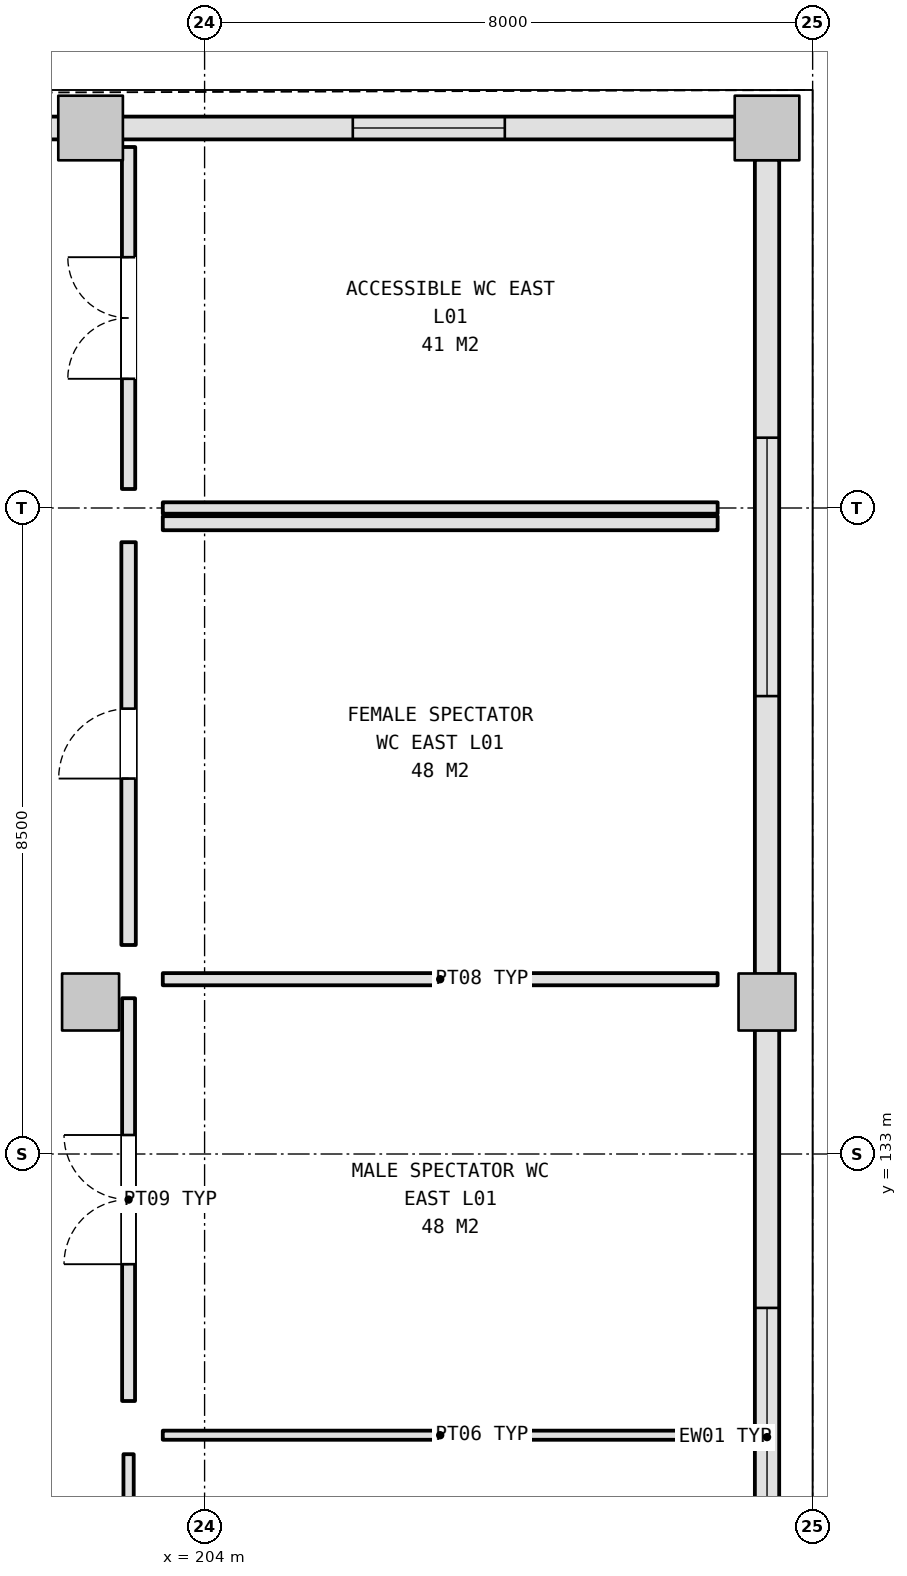
"""IFC4 building model, lengths in metres.
Left out: names, types, materials, properties, quantities, classifications, styles, units other than length and angle.
Written with IfcOpenShell. Run it as: python <this file> out.ifc"""

import sys

from ifc_helpers import new_model, si_unit, direction, frame, frame_2d, origin, origin_2d, place, context, subcontext, project, spatial, rectangle, extrude, element, fill, save


model = new_model("IFC4")
c1 = context("Model", 3, precision=1e-05, world=origin(), true_north=direction((0.0, 1.0)))
c2 = subcontext(c1, "Body", "Model", "MODEL_VIEW")
j1 = project(units=[si_unit("LENGTHUNIT", "METRE"), si_unit("PLANEANGLEUNIT", "RADIAN")], contexts=[c1])
p1 = place(None, origin())
s1 = spatial("IfcSite", under=j1, at=p1, CompositionType="ELEMENT")
p2 = place(p1, origin())
s2 = spatial("IfcBuilding", under=s1, at=p2, CompositionType="ELEMENT")
p3 = place(p2, frame((0.0, 0.0, 5.4)))
s3 = spatial("IfcBuildingStorey", under=s2, at=p3, CompositionType="ELEMENT", Elevation=5.4)
p4 = place(p3, frame((202.5, 135.0, 0.0), z_axis=(0.0, 0.0, 1.0), x_axis=(1.0, 0.0, 0.0)))
e1 = element("IfcColumn", 1, at=p4, inside=s3, PredefinedType="COLUMN", context=c2, shape_type="SweptSolid", body=[
    extrude(rectangle(XDim=0.75, YDim=0.75, at=origin_2d()), origin(), (0.0, 0.0, 1.0), 5.4),
])
p5 = place(p3, frame((202.5, 146.5, 0.0), z_axis=(0.0, 0.0, 1.0), x_axis=(1.0, 0.0, 0.0)))
e2 = element("IfcColumn", 2, at=p5, inside=s3, PredefinedType="COLUMN", context=c2, shape_type="SweptSolid", body=[
    extrude(rectangle(XDim=0.85, YDim=0.85, at=origin_2d()), origin(), (0.0, 0.0, 1.0), 5.4),
])
p6 = place(p3, frame((211.4, 135.0, 0.0), z_axis=(0.0, 0.0, 1.0), x_axis=(1.0, 0.0, 0.0)))
e3 = element("IfcColumn", 3, at=p6, inside=s3, PredefinedType="COLUMN", context=c2, shape_type="SweptSolid", body=[
    extrude(rectangle(XDim=0.75, YDim=0.75, at=origin_2d()), origin(), (0.0, 0.0, 1.0), 5.4),
])
p7 = place(p3, frame((211.4, 146.5, 0.0), z_axis=(0.0, 0.0, 1.0), x_axis=(1.0, 0.0, 0.0)))
e4 = element("IfcColumn", 4, at=p7, inside=s3, PredefinedType="COLUMN", context=c2, shape_type="SweptSolid", body=[
    extrude(rectangle(XDim=0.85, YDim=0.85, at=origin_2d()), origin(), (0.0, 0.0, 1.0), 5.4),
])
p8 = place(p3, frame((211.4, 123.913, 0.0), z_axis=(0.0, 0.0, 1.0), x_axis=(0.0, 1.0, 0.0)))
e5 = element("IfcWall", 5, at=p8, inside=s3, PredefinedType="SOLIDWALL", context=c2, shape_type="SweptSolid", body=[
    extrude(rectangle(XDim=10.724, YDim=0.32, at=frame_2d((5.362, 0.0))), origin(), (0.0, 0.0, 1.0), 4.475),
])
p9 = place(p8, frame((3.662, 0.0, 1.2)))
e6 = element("IfcOpeningElement", 6, at=p9, cuts=e5, PredefinedType="OPENING", context=c2, shape_type="SweptSolid", body=[
    extrude(rectangle(XDim=3.4, YDim=1.5, at=frame_2d((1.7, 0.75))), frame((0.0, 0.17, 0.0), z_axis=(0.0, -1.0, 0.0), x_axis=(1.0, 0.0, 0.0)), (0.0, 0.0, 1.0), 0.34),
])
p10 = place(p3, frame((211.4, 135.363, 0.0), z_axis=(0.0, 0.0, 1.0), x_axis=(0.0, 1.0, 0.0)))
e7 = element("IfcWall", 7, at=p10, inside=s3, PredefinedType="SOLIDWALL", context=c2, shape_type="SweptSolid", body=[
    extrude(rectangle(XDim=10.724, YDim=0.32, at=frame_2d((5.362, 0.0))), origin(), (0.0, 0.0, 1.0), 4.475),
])
p11 = place(p10, frame((3.662, 0.0, 1.2)))
e8 = element("IfcOpeningElement", 8, at=p11, cuts=e7, PredefinedType="OPENING", context=c2, shape_type="SweptSolid", body=[
    extrude(rectangle(XDim=3.4, YDim=1.5, at=frame_2d((1.7, 0.75))), frame((0.0, 0.17, 0.0), z_axis=(0.0, -1.0, 0.0), x_axis=(1.0, 0.0, 0.0)), (0.0, 0.0, 1.0), 0.34),
])
p12 = place(p3, frame((194.013, 146.5, 0.0), z_axis=(0.0, 0.0, 1.0), x_axis=(1.0, 0.0, 0.0)))
e9 = element("IfcWall", 9, at=p12, inside=s3, PredefinedType="SOLIDWALL", context=c2, shape_type="SweptSolid", body=[
    extrude(rectangle(XDim=8.074, YDim=0.3, at=frame_2d((4.037, 0.0))), origin(), (0.0, 0.0, 1.0), 4.525),
])
p13 = place(p12, frame((3.037, 0.0, 1.05)))
e10 = element("IfcOpeningElement", 10, at=p13, cuts=e9, PredefinedType="OPENING", context=c2, shape_type="SweptSolid", body=[
    extrude(rectangle(XDim=2.0, YDim=1.7, at=frame_2d((1.0, 0.85))), frame((0.0, 0.16, 0.0), z_axis=(0.0, -1.0, 0.0), x_axis=(1.0, 0.0, 0.0)), (0.0, 0.0, 1.0), 0.32),
])
p14 = place(p3, frame((202.913, 146.5, 0.0), z_axis=(0.0, 0.0, 1.0), x_axis=(1.0, 0.0, 0.0)))
e11 = element("IfcWall", 11, at=p14, inside=s3, PredefinedType="SOLIDWALL", context=c2, shape_type="SweptSolid", body=[
    extrude(rectangle(XDim=8.074, YDim=0.3, at=frame_2d((4.037, 0.0))), origin(), (0.0, 0.0, 1.0), 4.525),
])
p15 = place(p14, frame((3.037, 0.0, 1.05)))
e12 = element("IfcOpeningElement", 12, at=p15, cuts=e11, PredefinedType="OPENING", context=c2, shape_type="SweptSolid", body=[
    extrude(rectangle(XDim=2.0, YDim=1.7, at=frame_2d((1.0, 0.85))), frame((0.0, 0.16, 0.0), z_axis=(0.0, -1.0, 0.0), x_axis=(1.0, 0.0, 0.0)), (0.0, 0.0, 1.0), 0.32),
])
p16 = place(p3, frame((203.0, 119.75, 0.0), z_axis=(0.0, 0.0, 1.0), x_axis=(0.0, 1.0, 0.0)))
e13 = element("IfcWall", 13, at=p16, inside=s3, PredefinedType="PARTITIONING", context=c2, shape_type="SweptSolid", body=[
    extrude(rectangle(XDim=9.3, YDim=0.135, at=frame_2d((4.65, 0.0))), origin(), (0.0, 0.0, 1.0), 4.625),
])
p17 = place(p16, frame((4.575, 0.0, 0.0)))
e14 = element("IfcOpeningElement", 14, at=p17, cuts=e13, PredefinedType="OPENING", context=c2, shape_type="SweptSolid", body=[
    extrude(rectangle(XDim=0.95, YDim=2.15, at=frame_2d((0.475, 1.075))), frame((0.0, 0.077, 0.0), z_axis=(0.0, -1.0, 0.0), x_axis=(1.0, 0.0, 0.0)), (0.0, 0.0, 1.0), 0.155),
])
p18 = place(p3, frame((203.45, 129.3, 0.0), z_axis=(0.0, 0.0, 1.0), x_axis=(1.0, 0.0, 0.0)))
e15 = element("IfcWall", 15, at=p18, inside=s3, PredefinedType="PARTITIONING", context=c2, shape_type="SweptSolid", body=[
    extrude(rectangle(XDim=7.3, YDim=0.12, at=frame_2d((3.65, 0.0))), origin(), (0.0, 0.0, 1.0), 4.625),
])
p19 = place(p3, frame((203.0, 129.75, 0.0), z_axis=(0.0, 0.0, 1.0), x_axis=(0.0, 1.0, 0.0)))
e16 = element("IfcWall", 16, at=p19, inside=s3, PredefinedType="PARTITIONING", context=c2, shape_type="SweptSolid", body=[
    extrude(rectangle(XDim=5.3, YDim=0.17, at=frame_2d((2.65, 0.0))), origin(), (0.0, 0.0, 1.0), 4.715),
])
p20 = place(p19, frame((1.8, 0.0, 0.0)))
e17 = element("IfcOpeningElement", 17, at=p20, cuts=e16, PredefinedType="OPENING", context=c2, shape_type="SweptSolid", body=[
    extrude(rectangle(XDim=1.7, YDim=2.25, at=frame_2d((0.85, 1.125))), frame((0.0, 0.095, 0.0), z_axis=(0.0, -1.0, 0.0), x_axis=(1.0, 0.0, 0.0)), (0.0, 0.0, 1.0), 0.19),
])
p21 = place(p3, frame((203.45, 135.3, 0.0), z_axis=(0.0, 0.0, 1.0), x_axis=(1.0, 0.0, 0.0)))
e18 = element("IfcWall", 18, at=p21, inside=s3, PredefinedType="PARTITIONING", context=c2, shape_type="SweptSolid", body=[
    extrude(rectangle(XDim=7.3, YDim=0.16, at=frame_2d((3.65, 0.0))), origin(), (0.0, 0.0, 1.0), 5.12),
])
p22 = place(p3, frame((203.0, 135.75, 0.0), z_axis=(0.0, 0.0, 1.0), x_axis=(0.0, 1.0, 0.0)))
e19 = element("IfcWall", 19, at=p22, inside=s3, PredefinedType="PARTITIONING", context=c2, shape_type="SweptSolid", body=[
    extrude(rectangle(XDim=5.3, YDim=0.19, at=frame_2d((2.65, 0.0))), origin(), (0.0, 0.0, 1.0), 4.625),
])
p23 = place(p22, frame((2.19, 0.0, 0.0)))
e20 = element("IfcOpeningElement", 20, at=p23, cuts=e19, PredefinedType="OPENING", context=c2, shape_type="SweptSolid", body=[
    extrude(rectangle(XDim=0.92, YDim=2.1, at=frame_2d((0.46, 1.05))), frame((0.0, 0.105, 0.0), z_axis=(0.0, -1.0, 0.0), x_axis=(1.0, 0.0, 0.0)), (0.0, 0.0, 1.0), 0.21),
])
p24 = place(p3, frame((203.45, 141.3, 0.0), z_axis=(0.0, 0.0, 1.0), x_axis=(1.0, 0.0, 0.0)))
e21 = element("IfcWall", 21, at=p24, inside=s3, PredefinedType="PARTITIONING", context=c2, shape_type="SweptSolid", body=[
    extrude(rectangle(XDim=7.3, YDim=0.185, at=frame_2d((3.65, 0.0))), origin(), (0.0, 0.0, 1.0), 5.12),
])
p25 = place(p3, frame((203.0, 141.75, 0.0), z_axis=(0.0, 0.0, 1.0), x_axis=(0.0, 1.0, 0.0)))
e22 = element("IfcWall", 22, at=p25, inside=s3, PredefinedType="PARTITIONING", context=c2, shape_type="SweptSolid", body=[
    extrude(rectangle(XDim=4.5, YDim=0.175, at=frame_2d((2.25, 0.0))), origin(), (0.0, 0.0, 1.0), 5.12),
])
p26 = place(p25, frame((1.45, 0.0, 0.0)))
e23 = element("IfcOpeningElement", 23, at=p26, cuts=e22, PredefinedType="OPENING", context=c2, shape_type="SweptSolid", body=[
    extrude(rectangle(XDim=1.6, YDim=2.2, at=frame_2d((0.8, 1.1))), frame((0.0, 0.097, 0.0), z_axis=(0.0, -1.0, 0.0), x_axis=(1.0, 0.0, 0.0)), (0.0, 0.0, 1.0), 0.195),
])
p27 = place(p3, frame((210.75, 141.5, 0.0), z_axis=(0.0, 0.0, 1.0), x_axis=(-1.0, 0.0, 0.0)))
e24 = element("IfcWall", 24, at=p27, inside=s3, PredefinedType="PARTITIONING", context=c2, shape_type="SweptSolid", body=[
    extrude(rectangle(XDim=7.3, YDim=0.15, at=frame_2d((3.65, 0.0))), origin(), (0.0, 0.0, 1.0), 5.12),
])
p28 = place(p9, origin())
e25 = element("IfcWindow", 25, at=p28, inside=s3, PartitioningType="SINGLE_PANEL", PredefinedType="WINDOW", context=c2, shape_type="SweptSolid", body=[
    extrude(rectangle(XDim=3.4, YDim=1.5, at=frame_2d((1.7, 0.75))), frame((0.0, 0.03, 0.0), z_axis=(0.0, -1.0, 0.0), x_axis=(1.0, 0.0, 0.0)), (0.0, 0.0, 1.0), 0.06),
])
fill(e6, e25)
p29 = place(p11, origin())
e26 = element("IfcWindow", 26, at=p29, inside=s3, PartitioningType="SINGLE_PANEL", PredefinedType="WINDOW", context=c2, shape_type="SweptSolid", body=[
    extrude(rectangle(XDim=3.4, YDim=1.5, at=frame_2d((1.7, 0.75))), frame((0.0, 0.03, 0.0), z_axis=(0.0, -1.0, 0.0), x_axis=(1.0, 0.0, 0.0)), (0.0, 0.0, 1.0), 0.06),
])
fill(e8, e26)
p30 = place(p15, origin())
e27 = element("IfcWindow", 27, at=p30, inside=s3, PartitioningType="SINGLE_PANEL", PredefinedType="WINDOW", context=c2, shape_type="SweptSolid", body=[
    extrude(rectangle(XDim=2.0, YDim=1.7, at=frame_2d((1.0, 0.85))), frame((0.0, 0.03, 0.0), z_axis=(0.0, -1.0, 0.0), x_axis=(1.0, 0.0, 0.0)), (0.0, 0.0, 1.0), 0.06),
])
fill(e12, e27)
p31 = place(p20, origin())
e28 = element("IfcDoor", 28, at=p31, inside=s3, OperationType="DOUBLE_DOOR_SINGLE_SWING", PredefinedType="DOOR", context=c2, shape_type="SweptSolid", body=[
    extrude(rectangle(XDim=1.7, YDim=2.25, at=frame_2d((0.85, 1.125))), frame((0.0, 0.025, 0.0), z_axis=(0.0, -1.0, 0.0), x_axis=(1.0, 0.0, 0.0)), (0.0, 0.0, 1.0), 0.05),
])
fill(e17, e28)
p32 = place(p23, origin())
e29 = element("IfcDoor", 29, at=p32, inside=s3, OperationType="SINGLE_SWING_LEFT", PredefinedType="DOOR", context=c2, shape_type="SweptSolid", body=[
    extrude(rectangle(XDim=0.92, YDim=2.1, at=frame_2d((0.46, 1.05))), frame((0.0, 0.025, 0.0), z_axis=(0.0, -1.0, 0.0), x_axis=(1.0, 0.0, 0.0)), (0.0, 0.0, 1.0), 0.05),
])
fill(e20, e29)
p33 = place(p26, origin())
e30 = element("IfcDoor", 30, at=p33, inside=s3, OperationType="DOUBLE_DOOR_SINGLE_SWING", PredefinedType="DOOR", context=c2, shape_type="SweptSolid", body=[
    extrude(rectangle(XDim=1.6, YDim=2.2, at=frame_2d((0.8, 1.1))), frame((0.0, 0.025, 0.0), z_axis=(0.0, -1.0, 0.0), x_axis=(1.0, 0.0, 0.0)), (0.0, 0.0, 1.0), 0.05),
])
fill(e23, e30)
save(model, sys.argv[1])
